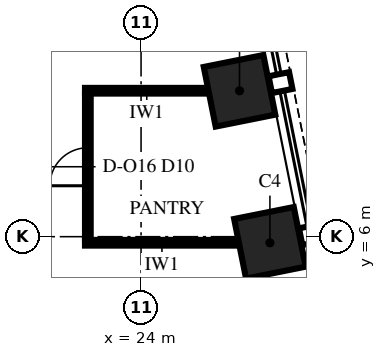
"""IFC4 building model, lengths in metres.
Left out: names, types, materials, properties, quantities, classifications, styles, units other than length and angle.
Written with IfcOpenShell. Run it as: python <this file> out.ifc"""

import sys

from ifc_helpers import new_model, si_unit, direction, frame, frame_2d, origin, origin_2d, place, context, subcontext, project, spatial, rectangle, extrude, element, fill, save


model = new_model("IFC4")
c1 = context("Model", 3, precision=1e-05, world=origin(), true_north=direction((0.0, 1.0)))
c2 = subcontext(c1, "Body", "Model", "MODEL_VIEW")
j1 = project(units=[si_unit("LENGTHUNIT", "METRE"), si_unit("PLANEANGLEUNIT", "RADIAN")], contexts=[c1])
p1 = place(None, origin())
s1 = spatial("IfcSite", under=j1, at=p1, CompositionType="ELEMENT")
p2 = place(p1, origin())
s2 = spatial("IfcBuilding", under=s1, at=p2, CompositionType="ELEMENT")
p3 = place(p2, frame((0.0, 0.0, 182.0)))
s3 = spatial("IfcBuildingStorey", under=s2, at=p3, CompositionType="ELEMENT", Elevation=182.0)
for number, where, z_axis, x_axis in (
    (1, (27.391, 5.838, 0.0), (0.0, 0.0, 1.0), (-0.196, 0.981, 0.0)),
    (2, (26.591, 9.838, 0.0), (0.0, 0.0, 1.0), (-0.196, 0.981, 0.0)),
):
    element("IfcColumn", number, at=place(p3, frame(where, z_axis=z_axis, x_axis=x_axis)), inside=s3, PredefinedType="COLUMN", context=c2, shape_type="SweptSolid", body=[
        extrude(rectangle(XDim=1.6, YDim=1.6, at=origin_2d()), origin(), (0.0, 0.0, 1.0), 4.0),
    ])
p4 = place(p3, frame((22.525, 5.84, 0.0), z_axis=(0.0, 0.0, 1.0), x_axis=(1.0, 0.0, 0.0)))
e3 = element("IfcWall", 3, at=p4, inside=s3, PredefinedType="PARTITIONING", context=c2, shape_type="SweptSolid", body=[
    extrude(rectangle(XDim=4.05, YDim=0.15, at=frame_2d((2.025, 0.0))), origin(), (0.0, 0.0, 1.0), 2.842),
])
p5 = place(p3, frame((22.525, 9.84, 0.0), z_axis=(0.0, 0.0, 1.0), x_axis=(1.0, 0.0, 0.0)))
e4 = element("IfcWall", 4, at=p5, inside=s3, PredefinedType="PARTITIONING", context=c2, shape_type="SweptSolid", body=[
    extrude(rectangle(XDim=3.25, YDim=0.15, at=frame_2d((1.625, 0.0))), origin(), (0.0, 0.0, 1.0), 3.25),
])
p6 = place(p3, frame((22.6, 5.915, 0.0), z_axis=(0.0, 0.0, 1.0), x_axis=(0.0, 1.0, 0.0)))
e5 = element("IfcWall", 5, at=p6, inside=s3, PredefinedType="PARTITIONING", context=c2, shape_type="SweptSolid", body=[
    extrude(rectangle(XDim=3.85, YDim=0.15, at=frame_2d((1.925, 0.0))), origin(), (0.0, 0.0, 1.0), 2.842),
])
p7 = place(p6, frame((1.425, 0.0, 0.0)))
e6 = element("IfcOpeningElement", 6, at=p7, cuts=e5, PredefinedType="OPENING", context=c2, shape_type="SweptSolid", body=[
    extrude(rectangle(XDim=1.0, YDim=2.3, at=frame_2d((0.5, 1.15))), frame((0.0, 0.09, 0.0), z_axis=(0.0, -1.0, 0.0), x_axis=(1.0, 0.0, 0.0)), (0.0, 0.0, 1.0), 0.18),
])
p8 = place(p7, origin())
e7 = element("IfcDoor", 7, at=p8, inside=s3, OperationType="SINGLE_SWING_LEFT", PredefinedType="DOOR", context=c2, shape_type="SweptSolid", body=[
    extrude(rectangle(XDim=1.0, YDim=2.3, at=frame_2d((0.5, 1.15))), frame((0.0, 0.075, 0.0), z_axis=(0.0, -1.0, 0.0), x_axis=(1.0, 0.0, 0.0)), (0.0, 0.0, 1.0), 0.149),
])
fill(e6, e7)
save(model, sys.argv[1])
